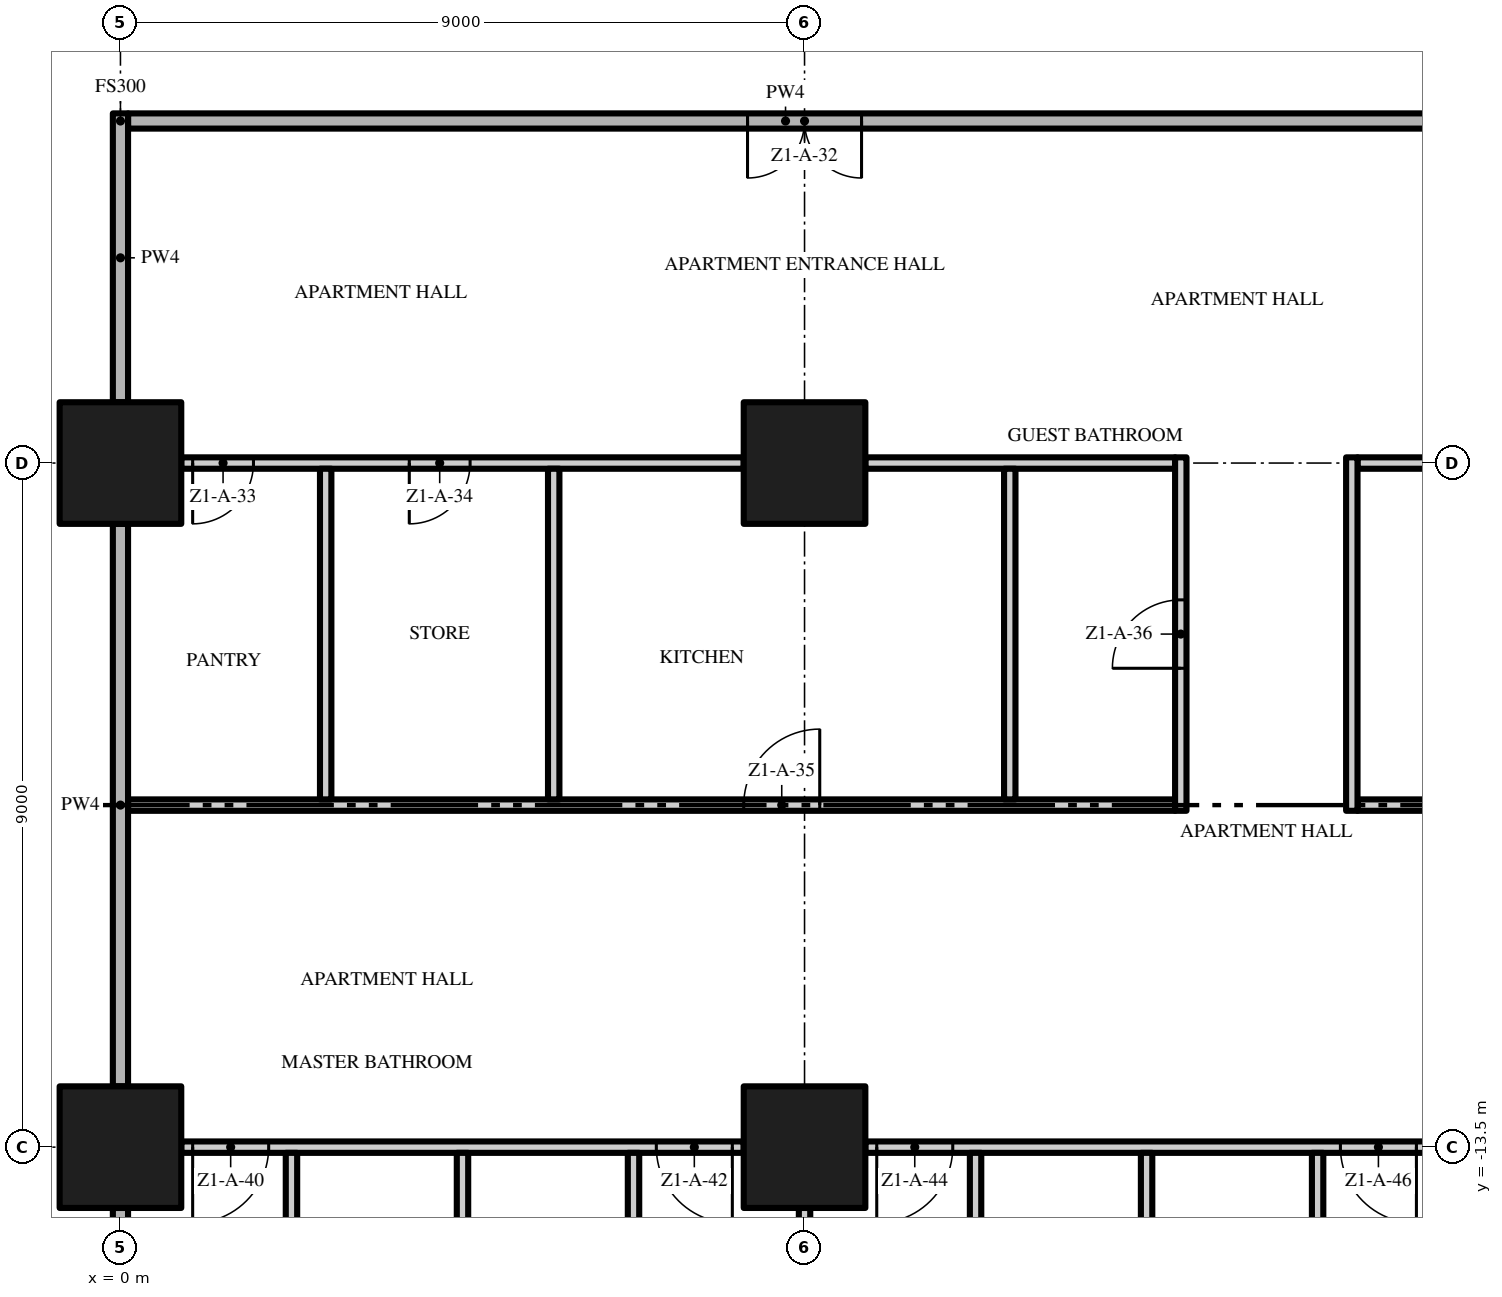
"""IFC4 building model, lengths in metres.
Left out: names, types, materials, properties, quantities, classifications, styles, units other than length and angle.
Written with IfcOpenShell. Run it as: python <this file> out.ifc"""

import sys

from ifc_helpers import new_model, si_unit, direction, frame, frame_2d, origin, origin_2d, place, context, subcontext, project, spatial, rectangle, extrude, element, fill, save


model = new_model("IFC4")
c1 = context("Model", 3, precision=1e-05, world=origin(), true_north=direction((0.0, 1.0)))
c2 = subcontext(c1, "Body", "Model", "MODEL_VIEW")
j1 = project(units=[si_unit("LENGTHUNIT", "METRE"), si_unit("PLANEANGLEUNIT", "RADIAN")], contexts=[c1])
p1 = place(None, origin())
s1 = spatial("IfcSite", under=j1, at=p1, CompositionType="ELEMENT")
p2 = place(p1, origin())
s2 = spatial("IfcBuilding", under=s1, at=p2, CompositionType="ELEMENT")
p3 = place(p2, frame((0.0, 0.0, 18.8)))
s3 = spatial("IfcBuildingStorey", under=s2, at=p3, CompositionType="ELEMENT", Elevation=18.8)
for number, where, z_axis, x_axis in (
    (1, (0.0, -13.5, 0.0), (0.0, 0.0, 1.0), (1.0, 0.0, 0.0)),
    (2, (0.0, -4.5, 0.0), (0.0, 0.0, 1.0), (1.0, 0.0, 0.0)),
    (3, (9.0, -13.5, 0.0), (0.0, 0.0, 1.0), (1.0, 0.0, 0.0)),
    (4, (9.0, -4.5, 0.0), (0.0, 0.0, 1.0), (1.0, 0.0, 0.0)),
):
    element("IfcColumn", number, at=place(p3, frame(where, z_axis=z_axis, x_axis=x_axis)), inside=s3, PredefinedType="COLUMN", context=c2, shape_type="SweptSolid", body=[
        extrude(rectangle(XDim=1.6, YDim=1.6, at=origin_2d()), origin(), (0.0, 0.0, 1.0), 3.5),
    ])
p4 = place(p3, frame((8.2, -13.5, 0.0), z_axis=(0.0, 0.0, 1.0), x_axis=(-1.0, 0.0, 0.0)))
e5 = element("IfcWall", 5, at=p4, inside=s3, PredefinedType="PARTITIONING", context=c2, shape_type="SweptSolid", body=[
    extrude(rectangle(XDim=7.4, YDim=0.15, at=frame_2d((3.7, 0.0))), origin(), (0.0, 0.0, 1.0), 3.5),
])
p5 = place(p4, frame((6.25, 0.0, 0.0)))
e6 = element("IfcOpeningElement", 6, at=p5, cuts=e5, PredefinedType="OPENING", context=c2, shape_type="SweptSolid", body=[
    extrude(rectangle(XDim=1.0, YDim=2.4, at=frame_2d((0.5, 1.2))), frame((0.0, 0.085, 0.0), z_axis=(0.0, -1.0, 0.0), x_axis=(1.0, 0.0, 0.0)), (0.0, 0.0, 1.0), 0.17),
])
p6 = place(p4, frame((0.15, 0.0, 0.0)))
e7 = element("IfcOpeningElement", 7, at=p6, cuts=e5, PredefinedType="OPENING", context=c2, shape_type="SweptSolid", body=[
    extrude(rectangle(XDim=1.0, YDim=2.4, at=frame_2d((0.5, 1.2))), frame((0.0, 0.085, 0.0), z_axis=(0.0, -1.0, 0.0), x_axis=(1.0, 0.0, 0.0)), (0.0, 0.0, 1.0), 0.17),
])
p7 = place(p3, frame((17.2, -13.5, 0.0), z_axis=(0.0, 0.0, 1.0), x_axis=(-1.0, 0.0, 0.0)))
e8 = element("IfcWall", 8, at=p7, inside=s3, PredefinedType="PARTITIONING", context=c2, shape_type="SweptSolid", body=[
    extrude(rectangle(XDim=7.4, YDim=0.15, at=frame_2d((3.7, 0.0))), origin(), (0.0, 0.0, 1.0), 3.5),
])
p8 = place(p7, frame((6.25, 0.0, 0.0)))
e9 = element("IfcOpeningElement", 9, at=p8, cuts=e8, PredefinedType="OPENING", context=c2, shape_type="SweptSolid", body=[
    extrude(rectangle(XDim=1.0, YDim=2.4, at=frame_2d((0.5, 1.2))), frame((0.0, 0.085, 0.0), z_axis=(0.0, -1.0, 0.0), x_axis=(1.0, 0.0, 0.0)), (0.0, 0.0, 1.0), 0.17),
])
p9 = place(p7, frame((0.15, 0.0, 0.0)))
e10 = element("IfcOpeningElement", 10, at=p9, cuts=e8, PredefinedType="OPENING", context=c2, shape_type="SweptSolid", body=[
    extrude(rectangle(XDim=1.0, YDim=2.4, at=frame_2d((0.5, 1.2))), frame((0.0, 0.085, 0.0), z_axis=(0.0, -1.0, 0.0), x_axis=(1.0, 0.0, 0.0)), (0.0, 0.0, 1.0), 0.17),
])
p10 = place(p3, frame((0.1, -9.0, 0.0), z_axis=(0.0, 0.0, 1.0), x_axis=(1.0, 0.0, 0.0)))
e11 = element("IfcWall", 11, at=p10, inside=s3, PredefinedType="PARTITIONING", context=c2, shape_type="SweptSolid", body=[
    extrude(rectangle(XDim=13.775, YDim=0.15, at=frame_2d((6.888, 0.0))), origin(), (0.0, 0.0, 1.0), 3.5),
])
p11 = place(p10, frame((8.1, 0.0, 0.0)))
e12 = element("IfcOpeningElement", 12, at=p11, cuts=e11, PredefinedType="OPENING", context=c2, shape_type="SweptSolid", body=[
    extrude(rectangle(XDim=1.0, YDim=2.4, at=frame_2d((0.5, 1.2))), frame((0.0, 0.085, 0.0), z_axis=(0.0, -1.0, 0.0), x_axis=(1.0, 0.0, 0.0)), (0.0, 0.0, 1.0), 0.17),
])
p12 = place(p3, frame((16.275, -9.0, 0.0), z_axis=(0.0, 0.0, 1.0), x_axis=(1.0, 0.0, 0.0)))
e13 = element("IfcWall", 13, at=p12, inside=s3, PredefinedType="PARTITIONING", context=c2, shape_type="SweptSolid", body=[
    extrude(rectangle(XDim=10.425, YDim=0.15, at=frame_2d((5.213, 0.0))), origin(), (0.0, 0.0, 1.0), 3.5),
])
p13 = place(p12, frame((9.425, 0.0, 0.0)))
e14 = element("IfcOpeningElement", 14, at=p13, cuts=e13, PredefinedType="OPENING", context=c2, shape_type="SweptSolid", body=[
    extrude(rectangle(XDim=0.8, YDim=2.0, at=frame_2d((0.4, 1.0))), frame((0.0, 0.085, 0.0), z_axis=(0.0, -1.0, 0.0), x_axis=(1.0, 0.0, 0.0)), (0.0, 0.0, 1.0), 0.17),
])
p14 = place(p3, frame((8.2, -4.5, 0.0), z_axis=(0.0, 0.0, 1.0), x_axis=(-1.0, 0.0, 0.0)))
e15 = element("IfcWall", 15, at=p14, inside=s3, PredefinedType="PARTITIONING", context=c2, shape_type="SweptSolid", body=[
    extrude(rectangle(XDim=7.4, YDim=0.15, at=frame_2d((3.7, 0.0))), origin(), (0.0, 0.0, 1.0), 3.5),
])
p15 = place(p14, frame((6.45, 0.0, 0.0)))
e16 = element("IfcOpeningElement", 16, at=p15, cuts=e15, PredefinedType="OPENING", context=c2, shape_type="SweptSolid", body=[
    extrude(rectangle(XDim=0.8, YDim=2.0, at=frame_2d((0.4, 1.0))), frame((0.0, 0.085, 0.0), z_axis=(0.0, -1.0, 0.0), x_axis=(1.0, 0.0, 0.0)), (0.0, 0.0, 1.0), 0.17),
])
p16 = place(p14, frame((3.6, 0.0, 0.0)))
e17 = element("IfcOpeningElement", 17, at=p16, cuts=e15, PredefinedType="OPENING", context=c2, shape_type="SweptSolid", body=[
    extrude(rectangle(XDim=0.8, YDim=2.0, at=frame_2d((0.4, 1.0))), frame((0.0, 0.085, 0.0), z_axis=(0.0, -1.0, 0.0), x_axis=(1.0, 0.0, 0.0)), (0.0, 0.0, 1.0), 0.17),
])
p17 = place(p3, frame((9.8, -4.5, 0.0), z_axis=(0.0, 0.0, 1.0), x_axis=(1.0, 0.0, 0.0)))
e18 = element("IfcWall", 18, at=p17, inside=s3, PredefinedType="PARTITIONING", context=c2, shape_type="SweptSolid", body=[
    extrude(rectangle(XDim=4.075, YDim=0.15, at=frame_2d((2.038, 0.0))), origin(), (0.0, 0.0, 1.0), 3.5),
])
p18 = place(p3, frame((16.275, -4.5, 0.0), z_axis=(0.0, 0.0, 1.0), x_axis=(1.0, 0.0, 0.0)))
e19 = element("IfcWall", 19, at=p18, inside=s3, PredefinedType="PARTITIONING", context=c2, shape_type="SweptSolid", body=[
    extrude(rectangle(XDim=0.925, YDim=0.15, at=frame_2d((0.463, 0.0))), origin(), (0.0, 0.0, 1.0), 3.5),
])
p19 = place(p3, frame((17.4, 0.0, 0.0), z_axis=(0.0, 0.0, 1.0), x_axis=(-1.0, 0.0, 0.0)))
e20 = element("IfcWall", 20, at=p19, inside=s3, PredefinedType="PARTITIONING", context=c2, shape_type="SweptSolid", body=[
    extrude(rectangle(XDim=17.3, YDim=0.2, at=frame_2d((8.65, 0.0))), origin(), (0.0, 0.0, 1.0), 3.5),
])
p20 = place(p19, frame((7.65, 0.0, 0.0)))
e21 = element("IfcOpeningElement", 21, at=p20, cuts=e20, PredefinedType="OPENING", context=c2, shape_type="SweptSolid", body=[
    extrude(rectangle(XDim=1.5, YDim=2.4, at=frame_2d((0.75, 1.2))), frame((0.0, 0.11, 0.0), z_axis=(0.0, -1.0, 0.0), x_axis=(1.0, 0.0, 0.0)), (0.0, 0.0, 1.0), 0.22),
])
p21 = place(p3, frame((0.0, -21.0, 0.0), z_axis=(0.0, 0.0, 1.0), x_axis=(0.0, 1.0, 0.0)))
e22 = element("IfcWall", 22, at=p21, inside=s3, PredefinedType="PARTITIONING", context=c2, shape_type="SweptSolid", body=[
    extrude(rectangle(XDim=6.7, YDim=0.2, at=frame_2d((3.35, 0.0))), origin(), (0.0, 0.0, 1.0), 3.5),
])
p22 = place(p3, frame((0.0, -12.7, 0.0), z_axis=(0.0, 0.0, 1.0), x_axis=(0.0, 1.0, 0.0)))
e23 = element("IfcWall", 23, at=p22, inside=s3, PredefinedType="PARTITIONING", context=c2, shape_type="SweptSolid", body=[
    extrude(rectangle(XDim=7.4, YDim=0.2, at=frame_2d((3.7, 0.0))), origin(), (0.0, 0.0, 1.0), 3.5),
])
p23 = place(p3, frame((0.0, -3.7, 0.0), z_axis=(0.0, 0.0, 1.0), x_axis=(0.0, 1.0, 0.0)))
e24 = element("IfcWall", 24, at=p23, inside=s3, PredefinedType="PARTITIONING", context=c2, shape_type="SweptSolid", body=[
    extrude(rectangle(XDim=3.8, YDim=0.2, at=frame_2d((1.9, 0.0))), origin(), (0.0, 0.0, 1.0), 3.5),
])
p24 = place(p3, frame((2.25, -16.575, 0.0), z_axis=(0.0, 0.0, 1.0), x_axis=(0.0, 1.0, 0.0)))
e25 = element("IfcWall", 25, at=p24, inside=s3, PredefinedType="PARTITIONING", context=c2, shape_type="SweptSolid", body=[
    extrude(rectangle(XDim=3.0, YDim=0.15, at=frame_2d((1.5, 0.0))), origin(), (0.0, 0.0, 1.0), 3.5),
])
p25 = place(p3, frame((2.7, -8.925, 0.0), z_axis=(0.0, 0.0, 1.0), x_axis=(0.0, 1.0, 0.0)))
e26 = element("IfcWall", 26, at=p25, inside=s3, PredefinedType="PARTITIONING", context=c2, shape_type="SweptSolid", body=[
    extrude(rectangle(XDim=4.35, YDim=0.15, at=frame_2d((2.175, 0.0))), origin(), (0.0, 0.0, 1.0), 3.5),
])
p26 = place(p3, frame((4.5, -22.2, 0.0), z_axis=(0.0, 0.0, 1.0), x_axis=(0.0, 1.0, 0.0)))
e27 = element("IfcWall", 27, at=p26, inside=s3, PredefinedType="PARTITIONING", context=c2, shape_type="SweptSolid", body=[
    extrude(rectangle(XDim=8.625, YDim=0.15, at=frame_2d((4.312, 0.0))), origin(), (0.0, 0.0, 1.0), 3.5),
])
p27 = place(p3, frame((5.7, -8.925, 0.0), z_axis=(0.0, 0.0, 1.0), x_axis=(0.0, 1.0, 0.0)))
e28 = element("IfcWall", 28, at=p27, inside=s3, PredefinedType="PARTITIONING", context=c2, shape_type="SweptSolid", body=[
    extrude(rectangle(XDim=4.35, YDim=0.15, at=frame_2d((2.175, 0.0))), origin(), (0.0, 0.0, 1.0), 3.5),
])
p28 = place(p3, frame((6.75, -16.575, 0.0), z_axis=(0.0, 0.0, 1.0), x_axis=(0.0, 1.0, 0.0)))
e29 = element("IfcWall", 29, at=p28, inside=s3, PredefinedType="PARTITIONING", context=c2, shape_type="SweptSolid", body=[
    extrude(rectangle(XDim=3.0, YDim=0.15, at=frame_2d((1.5, 0.0))), origin(), (0.0, 0.0, 1.0), 3.5),
])
p29 = place(p3, frame((9.0, -21.0, 0.0), z_axis=(0.0, 0.0, 1.0), x_axis=(0.0, 1.0, 0.0)))
e30 = element("IfcWall", 30, at=p29, inside=s3, PredefinedType="PARTITIONING", context=c2, shape_type="SweptSolid", body=[
    extrude(rectangle(XDim=6.7, YDim=0.15, at=frame_2d((3.35, 0.0))), origin(), (0.0, 0.0, 1.0), 3.5),
])
p30 = place(p3, frame((11.25, -16.575, 0.0), z_axis=(0.0, 0.0, 1.0), x_axis=(0.0, 1.0, 0.0)))
e31 = element("IfcWall", 31, at=p30, inside=s3, PredefinedType="PARTITIONING", context=c2, shape_type="SweptSolid", body=[
    extrude(rectangle(XDim=3.0, YDim=0.15, at=frame_2d((1.5, 0.0))), origin(), (0.0, 0.0, 1.0), 3.5),
])
p31 = place(p3, frame((11.7, -8.925, 0.0), z_axis=(0.0, 0.0, 1.0), x_axis=(0.0, 1.0, 0.0)))
e32 = element("IfcWall", 32, at=p31, inside=s3, PredefinedType="PARTITIONING", context=c2, shape_type="SweptSolid", body=[
    extrude(rectangle(XDim=4.35, YDim=0.15, at=frame_2d((2.175, 0.0))), origin(), (0.0, 0.0, 1.0), 3.5),
])
p32 = place(p3, frame((13.5, -22.2, 0.0), z_axis=(0.0, 0.0, 1.0), x_axis=(0.0, 1.0, 0.0)))
e33 = element("IfcWall", 33, at=p32, inside=s3, PredefinedType="PARTITIONING", context=c2, shape_type="SweptSolid", body=[
    extrude(rectangle(XDim=8.625, YDim=0.15, at=frame_2d((4.312, 0.0))), origin(), (0.0, 0.0, 1.0), 3.5),
])
p33 = place(p3, frame((13.95, -9.075, 0.0), z_axis=(0.0, 0.0, 1.0), x_axis=(0.0, 1.0, 0.0)))
e34 = element("IfcWall", 34, at=p33, inside=s3, PredefinedType="PARTITIONING", context=c2, shape_type="SweptSolid", body=[
    extrude(rectangle(XDim=4.65, YDim=0.15, at=frame_2d((2.325, 0.0))), origin(), (0.0, 0.0, 1.0), 3.5),
])
p34 = place(p33, frame((1.875, 0.0, 0.0)))
e35 = element("IfcOpeningElement", 35, at=p34, cuts=e34, PredefinedType="OPENING", context=c2, shape_type="SweptSolid", body=[
    extrude(rectangle(XDim=0.9, YDim=2.1, at=frame_2d((0.45, 1.05))), frame((0.0, 0.085, 0.0), z_axis=(0.0, -1.0, 0.0), x_axis=(1.0, 0.0, 0.0)), (0.0, 0.0, 1.0), 0.17),
])
p35 = place(p3, frame((15.75, -16.575, 0.0), z_axis=(0.0, 0.0, 1.0), x_axis=(0.0, 1.0, 0.0)))
e36 = element("IfcWall", 36, at=p35, inside=s3, PredefinedType="PARTITIONING", context=c2, shape_type="SweptSolid", body=[
    extrude(rectangle(XDim=3.0, YDim=0.15, at=frame_2d((1.5, 0.0))), origin(), (0.0, 0.0, 1.0), 3.5),
])
p36 = place(p3, frame((16.2, -9.075, 0.0), z_axis=(0.0, 0.0, 1.0), x_axis=(0.0, 1.0, 0.0)))
e37 = element("IfcWall", 37, at=p36, inside=s3, PredefinedType="PARTITIONING", context=c2, shape_type="SweptSolid", body=[
    extrude(rectangle(XDim=4.65, YDim=0.15, at=frame_2d((2.325, 0.0))), origin(), (0.0, 0.0, 1.0), 3.5),
])
p37 = place(p20, origin())
e38 = element("IfcDoor", 38, at=p37, inside=s3, OperationType="DOUBLE_DOOR_SINGLE_SWING", PredefinedType="DOOR", context=c2, shape_type="SweptSolid", body=[
    extrude(rectangle(XDim=1.5, YDim=2.4, at=frame_2d((0.75, 1.2))), frame((0.0, 0.025, 0.0), z_axis=(0.0, -1.0, 0.0), x_axis=(1.0, 0.0, 0.0)), (0.0, 0.0, 1.0), 0.05),
])
fill(e21, e38)
p38 = place(p15, origin())
e39 = element("IfcDoor", 39, at=p38, inside=s3, OperationType="SINGLE_SWING_RIGHT", PredefinedType="DOOR", context=c2, shape_type="SweptSolid", body=[
    extrude(rectangle(XDim=0.8, YDim=2.0, at=frame_2d((0.4, 1.0))), frame((0.0, 0.025, 0.0), z_axis=(0.0, -1.0, 0.0), x_axis=(1.0, 0.0, 0.0)), (0.0, 0.0, 1.0), 0.05),
])
fill(e16, e39)
p39 = place(p16, origin())
e40 = element("IfcDoor", 40, at=p39, inside=s3, OperationType="SINGLE_SWING_RIGHT", PredefinedType="DOOR", context=c2, shape_type="SweptSolid", body=[
    extrude(rectangle(XDim=0.8, YDim=2.0, at=frame_2d((0.4, 1.0))), frame((0.0, 0.025, 0.0), z_axis=(0.0, -1.0, 0.0), x_axis=(1.0, 0.0, 0.0)), (0.0, 0.0, 1.0), 0.05),
])
fill(e17, e40)
p40 = place(p11, origin())
e41 = element("IfcDoor", 41, at=p40, inside=s3, OperationType="SINGLE_SWING_RIGHT", PredefinedType="DOOR", context=c2, shape_type="SweptSolid", body=[
    extrude(rectangle(XDim=1.0, YDim=2.4, at=frame_2d((0.5, 1.2))), frame((0.0, 0.025, 0.0), z_axis=(0.0, -1.0, 0.0), x_axis=(1.0, 0.0, 0.0)), (0.0, 0.0, 1.0), 0.05),
])
fill(e12, e41)
p41 = place(p34, origin())
e42 = element("IfcDoor", 42, at=p41, inside=s3, OperationType="SINGLE_SWING_LEFT", PredefinedType="DOOR", context=c2, shape_type="SweptSolid", body=[
    extrude(rectangle(XDim=0.9, YDim=2.1, at=frame_2d((0.45, 1.05))), frame((0.0, 0.025, 0.0), z_axis=(0.0, -1.0, 0.0), x_axis=(1.0, 0.0, 0.0)), (0.0, 0.0, 1.0), 0.05),
])
fill(e35, e42)
p42 = place(p5, origin())
e43 = element("IfcDoor", 43, at=p42, inside=s3, OperationType="SINGLE_SWING_RIGHT", PredefinedType="DOOR", context=c2, shape_type="SweptSolid", body=[
    extrude(rectangle(XDim=1.0, YDim=2.4, at=frame_2d((0.5, 1.2))), frame((0.0, 0.025, 0.0), z_axis=(0.0, -1.0, 0.0), x_axis=(1.0, 0.0, 0.0)), (0.0, 0.0, 1.0), 0.05),
])
fill(e6, e43)
p43 = place(p6, origin())
e44 = element("IfcDoor", 44, at=p43, inside=s3, OperationType="SINGLE_SWING_LEFT", PredefinedType="DOOR", context=c2, shape_type="SweptSolid", body=[
    extrude(rectangle(XDim=1.0, YDim=2.4, at=frame_2d((0.5, 1.2))), frame((0.0, 0.025, 0.0), z_axis=(0.0, -1.0, 0.0), x_axis=(1.0, 0.0, 0.0)), (0.0, 0.0, 1.0), 0.05),
])
fill(e7, e44)
p44 = place(p8, origin())
e45 = element("IfcDoor", 45, at=p44, inside=s3, OperationType="SINGLE_SWING_RIGHT", PredefinedType="DOOR", context=c2, shape_type="SweptSolid", body=[
    extrude(rectangle(XDim=1.0, YDim=2.4, at=frame_2d((0.5, 1.2))), frame((0.0, 0.025, 0.0), z_axis=(0.0, -1.0, 0.0), x_axis=(1.0, 0.0, 0.0)), (0.0, 0.0, 1.0), 0.05),
])
fill(e9, e45)
p45 = place(p9, origin())
e46 = element("IfcDoor", 46, at=p45, inside=s3, OperationType="SINGLE_SWING_LEFT", PredefinedType="DOOR", context=c2, shape_type="SweptSolid", body=[
    extrude(rectangle(XDim=1.0, YDim=2.4, at=frame_2d((0.5, 1.2))), frame((0.0, 0.025, 0.0), z_axis=(0.0, -1.0, 0.0), x_axis=(1.0, 0.0, 0.0)), (0.0, 0.0, 1.0), 0.05),
])
fill(e10, e46)
save(model, sys.argv[1])
